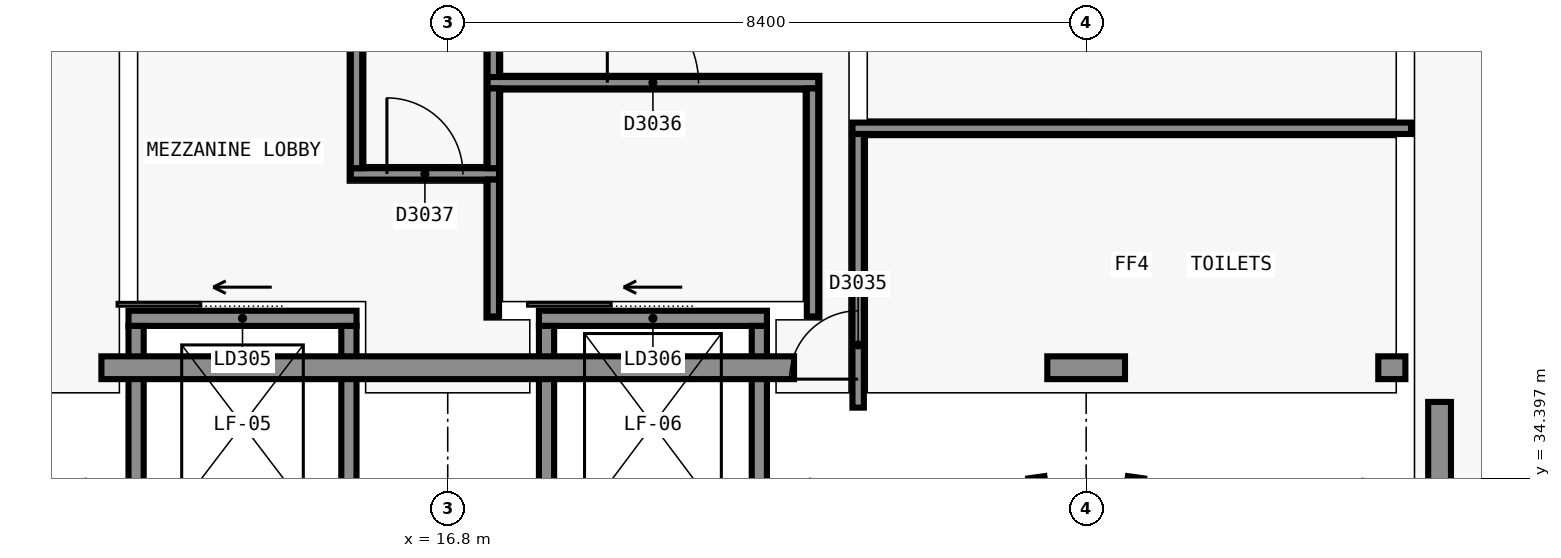
"""IFC4 building model, lengths in metres.
Left out: names, types, materials, properties, quantities, classifications, styles, units other than length and angle.
Written with IfcOpenShell. Run it as: python <this file> out.ifc"""

import sys

from ifc_helpers import new_model, si_unit, direction, frame, frame_2d, origin, place, context, subcontext, project, spatial, rectangle, extrude, element, fill, save


model = new_model("IFC4")
c1 = context("Model", 3, precision=1e-05, world=origin(), true_north=direction((0.0, 1.0)))
c2 = subcontext(c1, "Body", "Model", "MODEL_VIEW")
j1 = project(units=[si_unit("LENGTHUNIT", "METRE"), si_unit("PLANEANGLEUNIT", "RADIAN")], contexts=[c1])
p1 = place(None, origin())
s1 = spatial("IfcSite", under=j1, at=p1, CompositionType="ELEMENT")
p2 = place(p1, origin())
s2 = spatial("IfcBuilding", under=s1, at=p2, CompositionType="ELEMENT")
p3 = place(p2, frame((0.0, 0.0, 15.0)))
s3 = spatial("IfcBuildingStorey", under=s2, at=p3, CompositionType="ELEMENT", Elevation=15.0)
p4 = place(p3, frame((12.6, 36.5, 0.0), z_axis=(0.0, 0.0, 1.0), x_axis=(1.0, 0.0, 0.0)))
e1 = element("IfcWall", 1, at=p4, inside=s3, PredefinedType="SHEAR", context=c2, shape_type="SweptSolid", body=[
    extrude(rectangle(XDim=3.0, YDim=0.2, at=frame_2d((1.5, 0.0))), origin(), (0.0, 0.0, 1.0), 4.8),
])
p5 = place(p4, frame((0.95, 0.0, 0.0)))
e2 = element("IfcOpeningElement", 2, at=p5, cuts=e1, PredefinedType="OPENING", context=c2, shape_type="SweptSolid", body=[
    extrude(rectangle(XDim=1.1, YDim=2.1, at=frame_2d((0.55, 1.05))), frame((0.0, 0.11, 0.0), z_axis=(0.0, -1.0, 0.0), x_axis=(1.0, 0.0, 0.0)), (0.0, 0.0, 1.0), 0.22),
])
for number, where, z_axis, x_axis in (
    (3, (12.7, 33.8, 0.0), (0.0, 0.0, 1.0), (0.0, 1.0, 0.0)),
    (4, (15.5, 36.4, 0.0), (0.0, 0.0, 1.0), (0.0, -1.0, 0.0)),
):
    element("IfcWall", number, at=place(p3, frame(where, z_axis=z_axis, x_axis=x_axis)), inside=s3, PredefinedType="SHEAR", context=c2, shape_type="SweptSolid", body=[
        extrude(rectangle(XDim=2.6, YDim=0.2, at=frame_2d((1.3, 0.0))), origin(), (0.0, 0.0, 1.0), 4.8),
    ])
p6 = place(p3, frame((18.0, 36.5, 0.0), z_axis=(0.0, 0.0, 1.0), x_axis=(1.0, 0.0, 0.0)))
e5 = element("IfcWall", 5, at=p6, inside=s3, PredefinedType="SHEAR", context=c2, shape_type="SweptSolid", body=[
    extrude(rectangle(XDim=3.0, YDim=0.2, at=frame_2d((1.5, 0.0))), origin(), (0.0, 0.0, 1.0), 4.8),
])
p7 = place(p6, frame((0.95, 0.0, 0.0)))
e6 = element("IfcOpeningElement", 6, at=p7, cuts=e5, PredefinedType="OPENING", context=c2, shape_type="SweptSolid", body=[
    extrude(rectangle(XDim=1.1, YDim=2.1, at=frame_2d((0.55, 1.05))), frame((0.0, 0.11, 0.0), z_axis=(0.0, -1.0, 0.0), x_axis=(1.0, 0.0, 0.0)), (0.0, 0.0, 1.0), 0.22),
])
for number, where, z_axis, x_axis in (
    (7, (18.1, 33.8, 0.0), (0.0, 0.0, 1.0), (0.0, 1.0, 0.0)),
    (8, (20.9, 36.4, 0.0), (0.0, 0.0, 1.0), (0.0, -1.0, 0.0)),
):
    element("IfcWall", number, at=place(p3, frame(where, z_axis=z_axis, x_axis=x_axis)), inside=s3, PredefinedType="SHEAR", context=c2, shape_type="SweptSolid", body=[
        extrude(rectangle(XDim=2.6, YDim=0.2, at=frame_2d((1.3, 0.0))), origin(), (0.0, 0.0, 1.0), 4.8),
    ])
for number, where, z_axis, x_axis in (
    (9, (24.544, 34.409, 0.0), (0.0, 0.0, 1.0), (0.139, -0.99, 0.0)),
    (10, (25.856, 34.409, 0.0), (0.0, 0.0, 1.0), (-0.139, -0.99, 0.0)),
):
    element("IfcWall", number, at=place(p3, frame(where, z_axis=z_axis, x_axis=x_axis)), inside=s3, PredefinedType="SOLIDWALL", context=c2, shape_type="SweptSolid", body=[
        extrude(rectangle(XDim=1.8, YDim=0.215, at=frame_2d((0.9, 0.0))), origin(), (0.0, 0.0, 1.0), 4.5),
    ])
p8 = place(p3, frame((21.356, 35.85, 0.0), z_axis=(0.0, 0.0, 1.0), x_axis=(-1.0, 0.0, 0.0)))
e11 = element("IfcWall", 11, at=p8, inside=s3, PredefinedType="SOLIDWALL", context=c2, shape_type="SweptSolid", body=[
    extrude(rectangle(XDim=9.113, YDim=0.3, at=frame_2d((4.557, 0.0))), origin(), (0.0, 0.0, 1.0), 4.5),
])
p9 = place(p3, frame((25.711, 35.85, 0.0), z_axis=(0.0, 0.0, 1.0), x_axis=(-1.0, 0.0, 0.0)))
e12 = element("IfcWall", 12, at=p9, inside=s3, PredefinedType="SOLIDWALL", context=c2, shape_type="SweptSolid", body=[
    extrude(rectangle(XDim=1.022, YDim=0.3, at=frame_2d((0.511, 0.0))), origin(), (0.0, 0.0, 1.0), 4.5),
])
p10 = place(p3, frame((29.4, 35.85, 0.0), z_axis=(0.0, 0.0, 1.0), x_axis=(-1.0, 0.0, 0.0)))
e13 = element("IfcWall", 13, at=p10, inside=s3, PredefinedType="SOLIDWALL", context=c2, shape_type="SweptSolid", body=[
    extrude(rectangle(XDim=0.356, YDim=0.3, at=frame_2d((0.178, 0.0))), origin(), (0.0, 0.0, 1.0), 4.5),
])
p11 = place(p3, frame((29.85, 33.6, 0.0), z_axis=(0.0, 0.0, 1.0), x_axis=(0.0, 1.0, 0.0)))
e14 = element("IfcWall", 14, at=p11, inside=s3, PredefinedType="SOLIDWALL", context=c2, shape_type="SweptSolid", body=[
    extrude(rectangle(XDim=1.8, YDim=0.3, at=frame_2d((0.9, 0.0))), origin(), (0.0, 0.0, 1.0), 4.5),
])
p12 = place(p3, frame((15.525, 38.4, 0.0), z_axis=(0.0, 0.0, 1.0), x_axis=(1.0, 0.0, 0.0)))
e15 = element("IfcWall", 15, at=p12, inside=s3, PredefinedType="PARTITIONING", context=c2, shape_type="SweptSolid", body=[
    extrude(rectangle(XDim=1.95, YDim=0.15, at=frame_2d((0.975, 0.0))), origin(), (0.0, 0.0, 1.0), 3.8),
])
p13 = place(p12, frame((0.475, 0.0, 0.0)))
e16 = element("IfcOpeningElement", 16, at=p13, cuts=e15, PredefinedType="OPENING", context=c2, shape_type="SweptSolid", body=[
    extrude(rectangle(XDim=1.0, YDim=2.1, at=frame_2d((0.5, 1.05))), frame((0.0, 0.085, 0.0), z_axis=(0.0, -1.0, 0.0), x_axis=(1.0, 0.0, 0.0)), (0.0, 0.0, 1.0), 0.17),
])
p14 = place(p3, frame((22.125, 39.0, 0.0), z_axis=(0.0, 0.0, 1.0), x_axis=(1.0, 0.0, 0.0)))
e17 = element("IfcWall", 17, at=p14, inside=s3, PredefinedType="PARTITIONING", context=c2, shape_type="SweptSolid", body=[
    extrude(rectangle(XDim=7.35, YDim=0.15, at=frame_2d((3.675, 0.0))), origin(), (0.0, 0.0, 1.0), 3.8),
])
p15 = place(p3, frame((17.325, 39.6, 0.0), z_axis=(0.0, 0.0, 1.0), x_axis=(1.0, 0.0, 0.0)))
e18 = element("IfcWall", 18, at=p15, inside=s3, PredefinedType="SOLIDWALL", context=c2, shape_type="SweptSolid", body=[
    extrude(rectangle(XDim=4.35, YDim=0.15, at=frame_2d((2.175, 0.0))), origin(), (0.0, 0.0, 1.0), 3.8),
])
p16 = place(p15, frame((1.575, 0.0, 0.0)))
e19 = element("IfcOpeningElement", 19, at=p16, cuts=e18, PredefinedType="OPENING", context=c2, shape_type="SweptSolid", body=[
    extrude(rectangle(XDim=1.2, YDim=2.1, at=frame_2d((0.6, 1.05))), frame((0.0, 0.085, 0.0), z_axis=(0.0, -1.0, 0.0), x_axis=(1.0, 0.0, 0.0)), (0.0, 0.0, 1.0), 0.17),
])
p17 = place(p3, frame((15.6, 38.475, 0.0), z_axis=(0.0, 0.0, 1.0), x_axis=(0.0, 1.0, 0.0)))
e20 = element("IfcWall", 20, at=p17, inside=s3, PredefinedType="PARTITIONING", context=c2, shape_type="SweptSolid", body=[
    extrude(rectangle(XDim=1.65, YDim=0.15, at=frame_2d((0.825, 0.0))), origin(), (0.0, 0.0, 1.0), 4.5),
])
p18 = place(p3, frame((17.4, 39.675, 0.0), z_axis=(0.0, 0.0, 1.0), x_axis=(0.0, 1.0, 0.0)))
e21 = element("IfcWall", 21, at=p18, inside=s3, PredefinedType="PARTITIONING", context=c2, shape_type="SweptSolid", body=[
    extrude(rectangle(XDim=0.45, YDim=0.15, at=frame_2d((0.225, 0.0))), origin(), (0.0, 0.0, 1.0), 4.5),
])
p19 = place(p3, frame((22.2, 35.325, 0.0), z_axis=(0.0, 0.0, 1.0), x_axis=(0.0, 1.0, 0.0)))
e22 = element("IfcWall", 22, at=p19, inside=s3, PredefinedType="PARTITIONING", context=c2, shape_type="SweptSolid", body=[
    extrude(rectangle(XDim=3.6, YDim=0.15, at=frame_2d((1.8, 0.0))), origin(), (0.0, 0.0, 1.0), 4.5),
])
p20 = place(p19, frame((0.375, 0.0, 0.0)))
e23 = element("IfcOpeningElement", 23, at=p20, cuts=e22, PredefinedType="OPENING", context=c2, shape_type="SweptSolid", body=[
    extrude(rectangle(XDim=0.9, YDim=2.1, at=frame_2d((0.45, 1.05))), frame((0.0, 0.085, 0.0), z_axis=(0.0, -1.0, 0.0), x_axis=(1.0, 0.0, 0.0)), (0.0, 0.0, 1.0), 0.17),
])
p21 = place(p3, frame((17.4, 36.525, 0.0), z_axis=(0.0, 0.0, 1.0), x_axis=(0.0, 1.0, 0.0)))
e24 = element("IfcWall", 24, at=p21, inside=s3, PredefinedType="SOLIDWALL", context=c2, shape_type="SweptSolid", body=[
    extrude(rectangle(XDim=1.8, YDim=0.15, at=frame_2d((0.9, 0.0))), origin(), (0.0, 0.0, 1.0), 4.5),
])
p22 = place(p3, frame((17.4, 38.475, 0.0), z_axis=(0.0, 0.0, 1.0), x_axis=(0.0, 1.0, 0.0)))
e25 = element("IfcWall", 25, at=p22, inside=s3, PredefinedType="SOLIDWALL", context=c2, shape_type="SweptSolid", body=[
    extrude(rectangle(XDim=1.05, YDim=0.15, at=frame_2d((0.525, 0.0))), origin(), (0.0, 0.0, 1.0), 4.5),
])
p23 = place(p3, frame((21.6, 36.525, 0.0), z_axis=(0.0, 0.0, 1.0), x_axis=(0.0, 1.0, 0.0)))
e26 = element("IfcWall", 26, at=p23, inside=s3, PredefinedType="SOLIDWALL", context=c2, shape_type="SweptSolid", body=[
    extrude(rectangle(XDim=3.0, YDim=0.15, at=frame_2d((1.5, 0.0))), origin(), (0.0, 0.0, 1.0), 4.5),
])
p24 = place(p5, origin())
e27 = element("IfcDoor", 27, at=p24, inside=s3, OperationType="SLIDING_TO_LEFT", PredefinedType="DOOR", context=c2, shape_type="SweptSolid", body=[
    extrude(rectangle(XDim=1.1, YDim=2.1, at=frame_2d((0.55, 1.05))), frame((0.0, 0.025, 0.0), z_axis=(0.0, -1.0, 0.0), x_axis=(1.0, 0.0, 0.0)), (0.0, 0.0, 1.0), 0.05),
])
fill(e2, e27)
p25 = place(p7, origin())
e28 = element("IfcDoor", 28, at=p25, inside=s3, OperationType="SLIDING_TO_LEFT", PredefinedType="DOOR", context=c2, shape_type="SweptSolid", body=[
    extrude(rectangle(XDim=1.1, YDim=2.1, at=frame_2d((0.55, 1.05))), frame((0.0, 0.025, 0.0), z_axis=(0.0, -1.0, 0.0), x_axis=(1.0, 0.0, 0.0)), (0.0, 0.0, 1.0), 0.05),
])
fill(e6, e28)
p26 = place(p20, origin())
e29 = element("IfcDoor", 29, at=p26, inside=s3, OperationType="SINGLE_SWING_LEFT", PredefinedType="DOOR", context=c2, shape_type="SweptSolid", body=[
    extrude(rectangle(XDim=0.9, YDim=2.1, at=frame_2d((0.45, 1.05))), frame((0.0, 0.025, 0.0), z_axis=(0.0, -1.0, 0.0), x_axis=(1.0, 0.0, 0.0)), (0.0, 0.0, 1.0), 0.05),
])
fill(e23, e29)
p27 = place(p16, origin())
e30 = element("IfcDoor", 30, at=p27, inside=s3, OperationType="SINGLE_SWING_RIGHT", PredefinedType="DOOR", context=c2, shape_type="SweptSolid", body=[
    extrude(rectangle(XDim=1.2, YDim=2.1, at=frame_2d((0.6, 1.05))), frame((0.0, 0.025, 0.0), z_axis=(0.0, -1.0, 0.0), x_axis=(1.0, 0.0, 0.0)), (0.0, 0.0, 1.0), 0.05),
])
fill(e19, e30)
p28 = place(p13, origin())
e31 = element("IfcDoor", 31, at=p28, inside=s3, OperationType="SINGLE_SWING_RIGHT", PredefinedType="DOOR", context=c2, shape_type="SweptSolid", body=[
    extrude(rectangle(XDim=1.0, YDim=2.1, at=frame_2d((0.5, 1.05))), frame((0.0, 0.025, 0.0), z_axis=(0.0, -1.0, 0.0), x_axis=(1.0, 0.0, 0.0)), (0.0, 0.0, 1.0), 0.05),
])
fill(e16, e31)
save(model, sys.argv[1])
